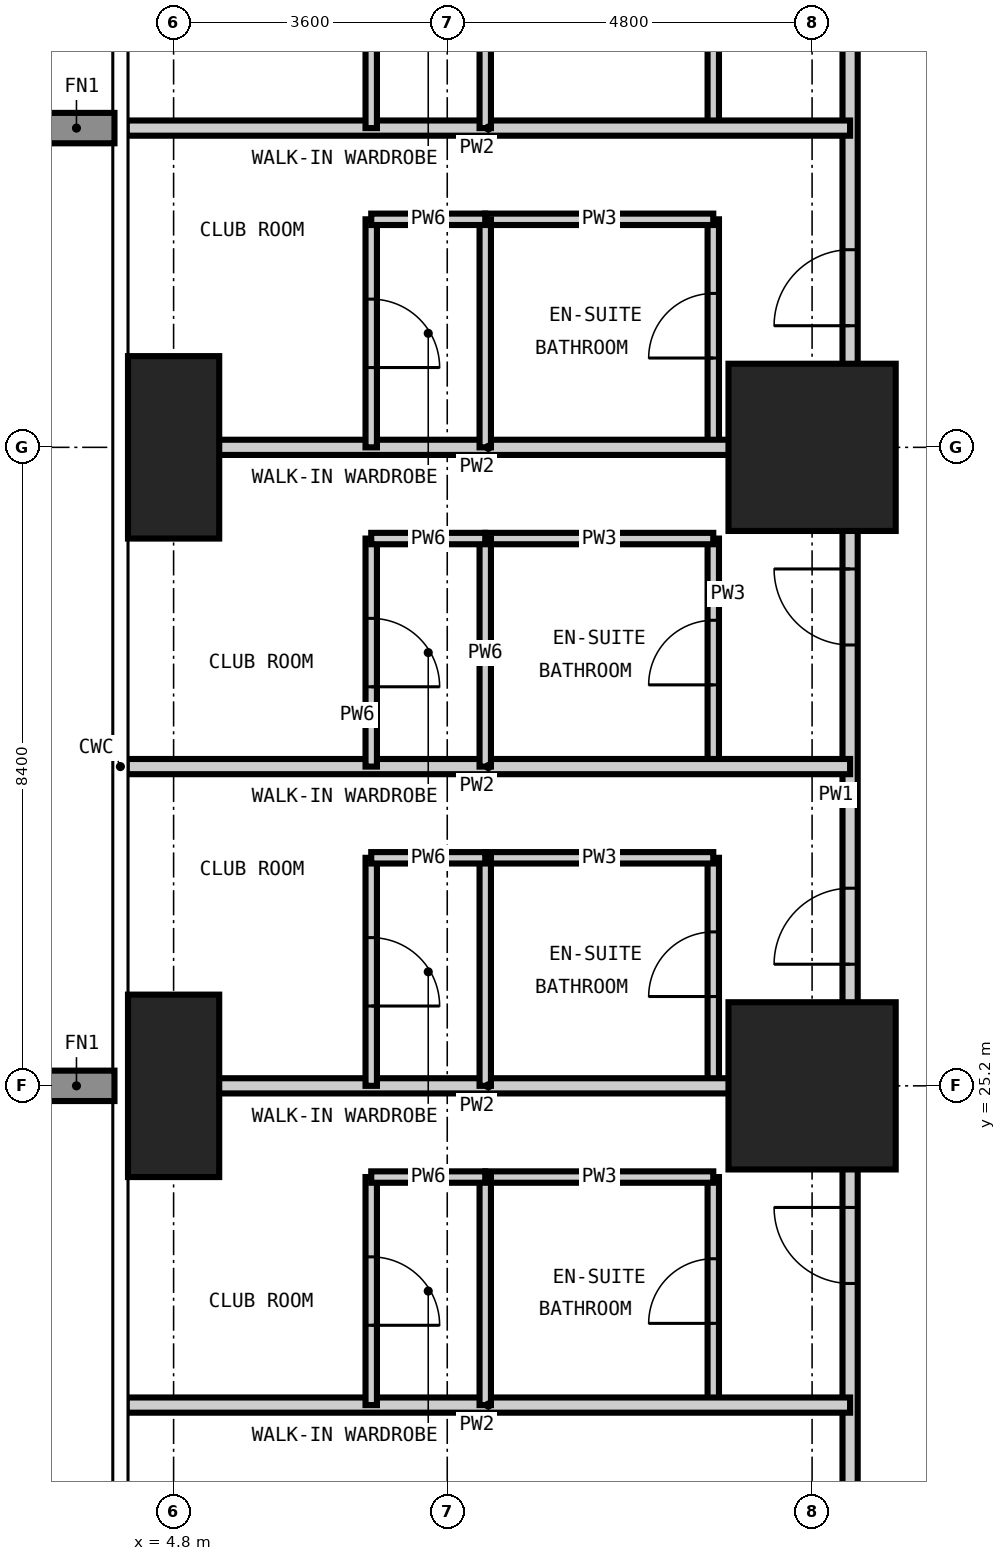
"""IFC4 building model, lengths in metres.
Left out: names, types, materials, properties, quantities, classifications, styles, units other than length and angle.
Written with IfcOpenShell. Run it as: python <this file> out.ifc"""

import sys

from ifc_helpers import new_model, si_unit, direction, frame, frame_2d, origin, origin_2d, place, context, subcontext, project, spatial, rectangle, extrude, element, fill, save


model = new_model("IFC4")
c1 = context("Model", 3, precision=1e-05, world=origin(), true_north=direction((0.0, 1.0)))
c2 = subcontext(c1, "Body", "Model", "MODEL_VIEW")
j1 = project(units=[si_unit("LENGTHUNIT", "METRE"), si_unit("PLANEANGLEUNIT", "RADIAN")], contexts=[c1])
p1 = place(None, origin())
s1 = spatial("IfcSite", under=j1, at=p1, CompositionType="ELEMENT")
p2 = place(p1, origin())
s2 = spatial("IfcBuilding", under=s1, at=p2, CompositionType="ELEMENT")
p3 = place(p2, frame((0.0, 0.0, 162.6)))
s3 = spatial("IfcBuildingStorey", under=s2, at=p3, CompositionType="ELEMENT", Elevation=162.6)
for number, where, z_axis, x_axis in (
    (1, (4.8, 25.2, -0.35), (0.0, 0.0, 1.0), (1.0, 0.0, 0.0)),
    (2, (4.8, 33.6, -0.35), (0.0, 0.0, 1.0), (1.0, 0.0, 0.0)),
):
    element("IfcColumn", number, at=place(p3, frame(where, z_axis=z_axis, x_axis=x_axis)), inside=s3, PredefinedType="COLUMN", context=c2, shape_type="SweptSolid", body=[
        extrude(rectangle(XDim=1.2, YDim=2.4, at=origin_2d()), origin(), (0.0, 0.0, 1.0), 3.6),
    ])
for number, where, z_axis, x_axis in (
    (3, (13.2, 25.2, -0.35), (0.0, 0.0, 1.0), (1.0, 0.0, 0.0)),
    (4, (13.2, 33.6, -0.35), (0.0, 0.0, 1.0), (1.0, 0.0, 0.0)),
):
    element("IfcColumn", number, at=place(p3, frame(where, z_axis=z_axis, x_axis=x_axis)), inside=s3, PredefinedType="COLUMN", context=c2, shape_type="SweptSolid", body=[
        extrude(rectangle(XDim=2.2, YDim=2.2, at=origin_2d()), origin(), (0.0, 0.0, 1.0), 3.6),
    ])
p4 = place(p3, frame((11.9, 21.0, 0.0), z_axis=(0.0, 0.0, 1.0), x_axis=(0.0, 1.0, 0.0)))
e5 = element("IfcWall", 5, at=p4, inside=s3, PredefinedType="PARTITIONING", context=c2, shape_type="SweptSolid", body=[
    extrude(rectangle(XDim=3.0, YDim=0.15, at=frame_2d((1.5, 0.0))), origin(), (0.0, 0.0, 1.0), 3.25),
])
p5 = place(p4, frame((1.075, 0.0, 0.0)))
e6 = element("IfcOpeningElement", 6, at=p5, cuts=e5, PredefinedType="OPENING", context=c2, shape_type="SweptSolid", body=[
    extrude(rectangle(XDim=0.85, YDim=2.1, at=frame_2d((0.425, 1.05))), frame((0.0, 0.085, 0.0), z_axis=(0.0, -1.0, 0.0), x_axis=(1.0, 0.0, 0.0)), (0.0, 0.0, 1.0), 0.17),
])
p6 = place(p3, frame((11.9, 25.2, 0.0), z_axis=(0.0, 0.0, 1.0), x_axis=(0.0, 1.0, 0.0)))
e7 = element("IfcWall", 7, at=p6, inside=s3, PredefinedType="PARTITIONING", context=c2, shape_type="SweptSolid", body=[
    extrude(rectangle(XDim=3.0, YDim=0.15, at=frame_2d((1.5, 0.0))), origin(), (0.0, 0.0, 1.0), 3.25),
])
p7 = place(p6, frame((1.175, 0.0, 0.0)))
e8 = element("IfcOpeningElement", 8, at=p7, cuts=e7, PredefinedType="OPENING", context=c2, shape_type="SweptSolid", body=[
    extrude(rectangle(XDim=0.85, YDim=2.1, at=frame_2d((0.425, 1.05))), frame((0.0, 0.085, 0.0), z_axis=(0.0, -1.0, 0.0), x_axis=(1.0, 0.0, 0.0)), (0.0, 0.0, 1.0), 0.17),
])
p8 = place(p3, frame((11.9, 29.4, 0.0), z_axis=(0.0, 0.0, 1.0), x_axis=(0.0, 1.0, 0.0)))
e9 = element("IfcWall", 9, at=p8, inside=s3, PredefinedType="PARTITIONING", context=c2, shape_type="SweptSolid", body=[
    extrude(rectangle(XDim=3.0, YDim=0.15, at=frame_2d((1.5, 0.0))), origin(), (0.0, 0.0, 1.0), 3.25),
])
p9 = place(p8, frame((1.075, 0.0, 0.0)))
e10 = element("IfcOpeningElement", 10, at=p9, cuts=e9, PredefinedType="OPENING", context=c2, shape_type="SweptSolid", body=[
    extrude(rectangle(XDim=0.85, YDim=2.1, at=frame_2d((0.425, 1.05))), frame((0.0, 0.085, 0.0), z_axis=(0.0, -1.0, 0.0), x_axis=(1.0, 0.0, 0.0)), (0.0, 0.0, 1.0), 0.17),
])
p10 = place(p3, frame((11.9, 33.6, 0.0), z_axis=(0.0, 0.0, 1.0), x_axis=(0.0, 1.0, 0.0)))
e11 = element("IfcWall", 11, at=p10, inside=s3, PredefinedType="PARTITIONING", context=c2, shape_type="SweptSolid", body=[
    extrude(rectangle(XDim=3.0, YDim=0.15, at=frame_2d((1.5, 0.0))), origin(), (0.0, 0.0, 1.0), 3.25),
])
p11 = place(p10, frame((1.175, 0.0, 0.0)))
e12 = element("IfcOpeningElement", 12, at=p11, cuts=e11, PredefinedType="OPENING", context=c2, shape_type="SweptSolid", body=[
    extrude(rectangle(XDim=0.85, YDim=2.1, at=frame_2d((0.425, 1.05))), frame((0.0, 0.085, 0.0), z_axis=(0.0, -1.0, 0.0), x_axis=(1.0, 0.0, 0.0)), (0.0, 0.0, 1.0), 0.17),
])
p12 = place(p3, frame((11.9, 37.8, 0.0), z_axis=(0.0, 0.0, 1.0), x_axis=(0.0, 1.0, 0.0)))
e13 = element("IfcWall", 13, at=p12, inside=s3, PredefinedType="PARTITIONING", context=c2, shape_type="SweptSolid", body=[
    extrude(rectangle(XDim=3.0, YDim=0.15, at=frame_2d((1.5, 0.0))), origin(), (0.0, 0.0, 1.0), 3.25),
])
p13 = place(p12, frame((1.075, 0.0, 0.0)))
e14 = element("IfcOpeningElement", 14, at=p13, cuts=e13, PredefinedType="OPENING", context=c2, shape_type="SweptSolid", body=[
    extrude(rectangle(XDim=0.85, YDim=2.1, at=frame_2d((0.425, 1.05))), frame((0.0, 0.085, 0.0), z_axis=(0.0, -1.0, 0.0), x_axis=(1.0, 0.0, 0.0)), (0.0, 0.0, 1.0), 0.17),
])
for number, where, z_axis, x_axis in (
    (15, (8.9, 24.0, 0.0), (0.0, 0.0, 1.0), (1.0, 0.0, 0.0)),
    (16, (8.9, 28.2, 0.0), (0.0, 0.0, 1.0), (1.0, 0.0, 0.0)),
    (17, (8.9, 32.4, 0.0), (0.0, 0.0, 1.0), (1.0, 0.0, 0.0)),
    (18, (8.9, 36.6, 0.0), (0.0, 0.0, 1.0), (1.0, 0.0, 0.0)),
):
    element("IfcWall", number, at=place(p3, frame(where, z_axis=z_axis, x_axis=x_axis)), inside=s3, PredefinedType="PARTITIONING", context=c2, shape_type="SweptSolid", body=[
        extrude(rectangle(XDim=3.0, YDim=0.15, at=frame_2d((1.5, 0.0))), origin(), (0.0, 0.0, 1.0), 3.25),
    ])
p14 = place(p3, frame((13.7, 13.7, 0.0), z_axis=(0.0, 0.0, 1.0), x_axis=(0.0, 1.0, 0.0)))
e19 = element("IfcWall", 19, at=p14, inside=s3, PredefinedType="PARTITIONING", context=c2, shape_type="SweptSolid", body=[
    extrude(rectangle(XDim=30.8, YDim=0.2, at=frame_2d((15.4, 0.0))), origin(), (0.0, 0.0, 1.0), 3.25),
])
p15 = place(p14, frame((4.7, 0.0, 0.0)))
e20 = element("IfcOpeningElement", 20, at=p15, cuts=e19, PredefinedType="OPENING", context=c2, shape_type="SweptSolid", body=[
    extrude(rectangle(XDim=1.0, YDim=2.2, at=frame_2d((0.5, 1.1))), frame((0.0, 0.11, 0.0), z_axis=(0.0, -1.0, 0.0), x_axis=(1.0, 0.0, 0.0)), (0.0, 0.0, 1.0), 0.22),
])
p16 = place(p14, frame((8.9, 0.0, 0.0)))
e21 = element("IfcOpeningElement", 21, at=p16, cuts=e19, PredefinedType="OPENING", context=c2, shape_type="SweptSolid", body=[
    extrude(rectangle(XDim=1.0, YDim=2.2, at=frame_2d((0.5, 1.1))), frame((0.0, 0.11, 0.0), z_axis=(0.0, -1.0, 0.0), x_axis=(1.0, 0.0, 0.0)), (0.0, 0.0, 1.0), 0.22),
])
p17 = place(p14, frame((13.1, 0.0, 0.0)))
e22 = element("IfcOpeningElement", 22, at=p17, cuts=e19, PredefinedType="OPENING", context=c2, shape_type="SweptSolid", body=[
    extrude(rectangle(XDim=1.0, YDim=2.2, at=frame_2d((0.5, 1.1))), frame((0.0, 0.11, 0.0), z_axis=(0.0, -1.0, 0.0), x_axis=(1.0, 0.0, 0.0)), (0.0, 0.0, 1.0), 0.22),
])
p18 = place(p14, frame((17.3, 0.0, 0.0)))
e23 = element("IfcOpeningElement", 23, at=p18, cuts=e19, PredefinedType="OPENING", context=c2, shape_type="SweptSolid", body=[
    extrude(rectangle(XDim=1.0, YDim=2.2, at=frame_2d((0.5, 1.1))), frame((0.0, 0.11, 0.0), z_axis=(0.0, -1.0, 0.0), x_axis=(1.0, 0.0, 0.0)), (0.0, 0.0, 1.0), 0.22),
])
p19 = place(p14, frame((21.5, 0.0, 0.0)))
e24 = element("IfcOpeningElement", 24, at=p19, cuts=e19, PredefinedType="OPENING", context=c2, shape_type="SweptSolid", body=[
    extrude(rectangle(XDim=1.0, YDim=2.2, at=frame_2d((0.5, 1.1))), frame((0.0, 0.11, 0.0), z_axis=(0.0, -1.0, 0.0), x_axis=(1.0, 0.0, 0.0)), (0.0, 0.0, 1.0), 0.22),
])
p20 = place(p14, frame((25.7, 0.0, 0.0)))
e25 = element("IfcOpeningElement", 25, at=p20, cuts=e19, PredefinedType="OPENING", context=c2, shape_type="SweptSolid", body=[
    extrude(rectangle(XDim=1.0, YDim=2.2, at=frame_2d((0.5, 1.1))), frame((0.0, 0.11, 0.0), z_axis=(0.0, -1.0, 0.0), x_axis=(1.0, 0.0, 0.0)), (0.0, 0.0, 1.0), 0.22),
])
p21 = place(p14, frame((0.95, 0.0, 0.0)))
e26 = element("IfcOpeningElement", 26, at=p21, cuts=e19, PredefinedType="OPENING", context=c2, shape_type="SweptSolid", body=[
    extrude(rectangle(XDim=1.0, YDim=2.2, at=frame_2d((0.5, 1.1))), frame((0.0, 0.11, 0.0), z_axis=(0.0, -1.0, 0.0), x_axis=(1.0, 0.0, 0.0)), (0.0, 0.0, 1.0), 0.22),
])
p22 = place(p14, frame((29.45, 0.0, 0.0)))
e27 = element("IfcOpeningElement", 27, at=p22, cuts=e19, PredefinedType="OPENING", context=c2, shape_type="SweptSolid", body=[
    extrude(rectangle(XDim=1.0, YDim=2.2, at=frame_2d((0.5, 1.1))), frame((0.0, 0.11, 0.0), z_axis=(0.0, -1.0, 0.0), x_axis=(1.0, 0.0, 0.0)), (0.0, 0.0, 1.0), 0.22),
])
for number, where, z_axis, x_axis in (
    (28, (4.182, 21.0, 0.0), (0.0, 0.0, 1.0), (1.0, 0.0, 0.0)),
    (29, (4.182, 25.2, 0.0), (0.0, 0.0, 1.0), (1.0, 0.0, 0.0)),
    (30, (4.182, 29.4, 0.0), (0.0, 0.0, 1.0), (1.0, 0.0, 0.0)),
    (31, (4.182, 33.6, 0.0), (0.0, 0.0, 1.0), (1.0, 0.0, 0.0)),
    (32, (4.182, 37.8, 0.0), (0.0, 0.0, 1.0), (1.0, 0.0, 0.0)),
):
    element("IfcWall", number, at=place(p3, frame(where, z_axis=z_axis, x_axis=x_axis)), inside=s3, PredefinedType="PARTITIONING", context=c2, shape_type="SweptSolid", body=[
        extrude(rectangle(XDim=9.518, YDim=0.2, at=frame_2d((4.759, 0.0))), origin(), (0.0, 0.0, 1.0), 3.25),
    ])
p23 = place(p3, frame((7.4, 21.0, 0.0), z_axis=(0.0, 0.0, 1.0), x_axis=(0.0, 1.0, 0.0)))
e33 = element("IfcWall", 33, at=p23, inside=s3, PredefinedType="PARTITIONING", context=c2, shape_type="SweptSolid", body=[
    extrude(rectangle(XDim=3.0, YDim=0.15, at=frame_2d((1.5, 0.0))), origin(), (0.0, 0.0, 1.0), 3.25),
])
p24 = place(p23, frame((1.05, 0.0, 0.0)))
e34 = element("IfcOpeningElement", 34, at=p24, cuts=e33, PredefinedType="OPENING", context=c2, shape_type="SweptSolid", body=[
    extrude(rectangle(XDim=0.9, YDim=2.1, at=frame_2d((0.45, 1.05))), frame((0.0, 0.085, 0.0), z_axis=(0.0, -1.0, 0.0), x_axis=(1.0, 0.0, 0.0)), (0.0, 0.0, 1.0), 0.17),
])
p25 = place(p3, frame((7.4, 25.2, 0.0), z_axis=(0.0, 0.0, 1.0), x_axis=(0.0, 1.0, 0.0)))
e35 = element("IfcWall", 35, at=p25, inside=s3, PredefinedType="PARTITIONING", context=c2, shape_type="SweptSolid", body=[
    extrude(rectangle(XDim=3.0, YDim=0.15, at=frame_2d((1.5, 0.0))), origin(), (0.0, 0.0, 1.0), 3.25),
])
p26 = place(p25, frame((1.05, 0.0, 0.0)))
e36 = element("IfcOpeningElement", 36, at=p26, cuts=e35, PredefinedType="OPENING", context=c2, shape_type="SweptSolid", body=[
    extrude(rectangle(XDim=0.9, YDim=2.1, at=frame_2d((0.45, 1.05))), frame((0.0, 0.085, 0.0), z_axis=(0.0, -1.0, 0.0), x_axis=(1.0, 0.0, 0.0)), (0.0, 0.0, 1.0), 0.17),
])
p27 = place(p3, frame((7.4, 29.4, 0.0), z_axis=(0.0, 0.0, 1.0), x_axis=(0.0, 1.0, 0.0)))
e37 = element("IfcWall", 37, at=p27, inside=s3, PredefinedType="PARTITIONING", context=c2, shape_type="SweptSolid", body=[
    extrude(rectangle(XDim=3.0, YDim=0.15, at=frame_2d((1.5, 0.0))), origin(), (0.0, 0.0, 1.0), 3.25),
])
p28 = place(p27, frame((1.05, 0.0, 0.0)))
e38 = element("IfcOpeningElement", 38, at=p28, cuts=e37, PredefinedType="OPENING", context=c2, shape_type="SweptSolid", body=[
    extrude(rectangle(XDim=0.9, YDim=2.1, at=frame_2d((0.45, 1.05))), frame((0.0, 0.085, 0.0), z_axis=(0.0, -1.0, 0.0), x_axis=(1.0, 0.0, 0.0)), (0.0, 0.0, 1.0), 0.17),
])
p29 = place(p3, frame((7.4, 33.6, 0.0), z_axis=(0.0, 0.0, 1.0), x_axis=(0.0, 1.0, 0.0)))
e39 = element("IfcWall", 39, at=p29, inside=s3, PredefinedType="PARTITIONING", context=c2, shape_type="SweptSolid", body=[
    extrude(rectangle(XDim=3.0, YDim=0.15, at=frame_2d((1.5, 0.0))), origin(), (0.0, 0.0, 1.0), 3.25),
])
p30 = place(p29, frame((1.05, 0.0, 0.0)))
e40 = element("IfcOpeningElement", 40, at=p30, cuts=e39, PredefinedType="OPENING", context=c2, shape_type="SweptSolid", body=[
    extrude(rectangle(XDim=0.9, YDim=2.1, at=frame_2d((0.45, 1.05))), frame((0.0, 0.085, 0.0), z_axis=(0.0, -1.0, 0.0), x_axis=(1.0, 0.0, 0.0)), (0.0, 0.0, 1.0), 0.17),
])
p31 = place(p3, frame((7.4, 37.8, 0.0), z_axis=(0.0, 0.0, 1.0), x_axis=(0.0, 1.0, 0.0)))
e41 = element("IfcWall", 41, at=p31, inside=s3, PredefinedType="PARTITIONING", context=c2, shape_type="SweptSolid", body=[
    extrude(rectangle(XDim=3.0, YDim=0.15, at=frame_2d((1.5, 0.0))), origin(), (0.0, 0.0, 1.0), 3.25),
])
p32 = place(p31, frame((1.05, 0.0, 0.0)))
e42 = element("IfcOpeningElement", 42, at=p32, cuts=e41, PredefinedType="OPENING", context=c2, shape_type="SweptSolid", body=[
    extrude(rectangle(XDim=0.9, YDim=2.1, at=frame_2d((0.45, 1.05))), frame((0.0, 0.085, 0.0), z_axis=(0.0, -1.0, 0.0), x_axis=(1.0, 0.0, 0.0)), (0.0, 0.0, 1.0), 0.17),
])
for number, where, z_axis, x_axis in (
    (43, (8.9, 21.0, 0.0), (0.0, 0.0, 1.0), (0.0, 1.0, 0.0)),
    (44, (8.9, 25.2, 0.0), (0.0, 0.0, 1.0), (0.0, 1.0, 0.0)),
    (45, (8.9, 29.4, 0.0), (0.0, 0.0, 1.0), (0.0, 1.0, 0.0)),
    (46, (8.9, 33.6, 0.0), (0.0, 0.0, 1.0), (0.0, 1.0, 0.0)),
    (47, (8.9, 37.8, 0.0), (0.0, 0.0, 1.0), (0.0, 1.0, 0.0)),
):
    element("IfcWall", number, at=place(p3, frame(where, z_axis=z_axis, x_axis=x_axis)), inside=s3, PredefinedType="PARTITIONING", context=c2, shape_type="SweptSolid", body=[
        extrude(rectangle(XDim=3.0, YDim=0.15, at=frame_2d((1.5, 0.0))), origin(), (0.0, 0.0, 1.0), 3.25),
    ])
for number, where, z_axis, x_axis in (
    (48, (7.4, 24.0, 0.0), (0.0, 0.0, 1.0), (1.0, 0.0, 0.0)),
    (49, (7.4, 28.2, 0.0), (0.0, 0.0, 1.0), (1.0, 0.0, 0.0)),
    (50, (7.4, 32.4, 0.0), (0.0, 0.0, 1.0), (1.0, 0.0, 0.0)),
    (51, (7.4, 36.6, 0.0), (0.0, 0.0, 1.0), (1.0, 0.0, 0.0)),
):
    element("IfcWall", number, at=place(p3, frame(where, z_axis=z_axis, x_axis=x_axis)), inside=s3, PredefinedType="PARTITIONING", context=c2, shape_type="SweptSolid", body=[
        extrude(rectangle(XDim=1.5, YDim=0.15, at=frame_2d((0.75, 0.0))), origin(), (0.0, 0.0, 1.0), 3.25),
    ])
p33 = place(p16, origin())
e52 = element("IfcDoor", 52, at=p33, inside=s3, OperationType="SINGLE_SWING_RIGHT", PredefinedType="DOOR", context=c2, shape_type="SweptSolid", body=[
    extrude(rectangle(XDim=1.0, YDim=2.2, at=frame_2d((0.5, 1.1))), frame((0.0, 0.025, 0.0), z_axis=(0.0, -1.0, 0.0), x_axis=(1.0, 0.0, 0.0)), (0.0, 0.0, 1.0), 0.05),
])
fill(e21, e52)
p34 = place(p5, origin())
e53 = element("IfcDoor", 53, at=p34, inside=s3, OperationType="SINGLE_SWING_LEFT", PredefinedType="DOOR", context=c2, shape_type="SweptSolid", body=[
    extrude(rectangle(XDim=0.85, YDim=2.1, at=frame_2d((0.425, 1.05))), frame((0.0, 0.025, 0.0), z_axis=(0.0, -1.0, 0.0), x_axis=(1.0, 0.0, 0.0)), (0.0, 0.0, 1.0), 0.05),
])
fill(e6, e53)
p35 = place(p24, frame((0.9, 0.0, 0.0), z_axis=(0.0, 0.0, 1.0), x_axis=(-1.0, 0.0, 0.0)))
e54 = element("IfcDoor", 54, at=p35, inside=s3, OperationType="SINGLE_SWING_RIGHT", PredefinedType="DOOR", context=c2, shape_type="SweptSolid", body=[
    extrude(rectangle(XDim=0.9, YDim=2.1, at=frame_2d((0.45, 1.05))), frame((0.0, 0.025, 0.0), z_axis=(0.0, -1.0, 0.0), x_axis=(1.0, 0.0, 0.0)), (0.0, 0.0, 1.0), 0.05),
])
fill(e34, e54)
p36 = place(p17, origin())
e55 = element("IfcDoor", 55, at=p36, inside=s3, OperationType="SINGLE_SWING_LEFT", PredefinedType="DOOR", context=c2, shape_type="SweptSolid", body=[
    extrude(rectangle(XDim=1.0, YDim=2.2, at=frame_2d((0.5, 1.1))), frame((0.0, 0.025, 0.0), z_axis=(0.0, -1.0, 0.0), x_axis=(1.0, 0.0, 0.0)), (0.0, 0.0, 1.0), 0.05),
])
fill(e22, e55)
p37 = place(p7, origin())
e56 = element("IfcDoor", 56, at=p37, inside=s3, OperationType="SINGLE_SWING_LEFT", PredefinedType="DOOR", context=c2, shape_type="SweptSolid", body=[
    extrude(rectangle(XDim=0.85, YDim=2.1, at=frame_2d((0.425, 1.05))), frame((0.0, 0.025, 0.0), z_axis=(0.0, -1.0, 0.0), x_axis=(1.0, 0.0, 0.0)), (0.0, 0.0, 1.0), 0.05),
])
fill(e8, e56)
p38 = place(p26, frame((0.9, 0.0, 0.0), z_axis=(0.0, 0.0, 1.0), x_axis=(-1.0, 0.0, 0.0)))
e57 = element("IfcDoor", 57, at=p38, inside=s3, OperationType="SINGLE_SWING_RIGHT", PredefinedType="DOOR", context=c2, shape_type="SweptSolid", body=[
    extrude(rectangle(XDim=0.9, YDim=2.1, at=frame_2d((0.45, 1.05))), frame((0.0, 0.025, 0.0), z_axis=(0.0, -1.0, 0.0), x_axis=(1.0, 0.0, 0.0)), (0.0, 0.0, 1.0), 0.05),
])
fill(e36, e57)
p39 = place(p18, origin())
e58 = element("IfcDoor", 58, at=p39, inside=s3, OperationType="SINGLE_SWING_RIGHT", PredefinedType="DOOR", context=c2, shape_type="SweptSolid", body=[
    extrude(rectangle(XDim=1.0, YDim=2.2, at=frame_2d((0.5, 1.1))), frame((0.0, 0.025, 0.0), z_axis=(0.0, -1.0, 0.0), x_axis=(1.0, 0.0, 0.0)), (0.0, 0.0, 1.0), 0.05),
])
fill(e23, e58)
p40 = place(p9, origin())
e59 = element("IfcDoor", 59, at=p40, inside=s3, OperationType="SINGLE_SWING_LEFT", PredefinedType="DOOR", context=c2, shape_type="SweptSolid", body=[
    extrude(rectangle(XDim=0.85, YDim=2.1, at=frame_2d((0.425, 1.05))), frame((0.0, 0.025, 0.0), z_axis=(0.0, -1.0, 0.0), x_axis=(1.0, 0.0, 0.0)), (0.0, 0.0, 1.0), 0.05),
])
fill(e10, e59)
p41 = place(p28, frame((0.9, 0.0, 0.0), z_axis=(0.0, 0.0, 1.0), x_axis=(-1.0, 0.0, 0.0)))
e60 = element("IfcDoor", 60, at=p41, inside=s3, OperationType="SINGLE_SWING_RIGHT", PredefinedType="DOOR", context=c2, shape_type="SweptSolid", body=[
    extrude(rectangle(XDim=0.9, YDim=2.1, at=frame_2d((0.45, 1.05))), frame((0.0, 0.025, 0.0), z_axis=(0.0, -1.0, 0.0), x_axis=(1.0, 0.0, 0.0)), (0.0, 0.0, 1.0), 0.05),
])
fill(e38, e60)
p42 = place(p19, origin())
e61 = element("IfcDoor", 61, at=p42, inside=s3, OperationType="SINGLE_SWING_LEFT", PredefinedType="DOOR", context=c2, shape_type="SweptSolid", body=[
    extrude(rectangle(XDim=1.0, YDim=2.2, at=frame_2d((0.5, 1.1))), frame((0.0, 0.025, 0.0), z_axis=(0.0, -1.0, 0.0), x_axis=(1.0, 0.0, 0.0)), (0.0, 0.0, 1.0), 0.05),
])
fill(e24, e61)
p43 = place(p11, origin())
e62 = element("IfcDoor", 62, at=p43, inside=s3, OperationType="SINGLE_SWING_LEFT", PredefinedType="DOOR", context=c2, shape_type="SweptSolid", body=[
    extrude(rectangle(XDim=0.85, YDim=2.1, at=frame_2d((0.425, 1.05))), frame((0.0, 0.025, 0.0), z_axis=(0.0, -1.0, 0.0), x_axis=(1.0, 0.0, 0.0)), (0.0, 0.0, 1.0), 0.05),
])
fill(e12, e62)
p44 = place(p30, frame((0.9, 0.0, 0.0), z_axis=(0.0, 0.0, 1.0), x_axis=(-1.0, 0.0, 0.0)))
e63 = element("IfcDoor", 63, at=p44, inside=s3, OperationType="SINGLE_SWING_RIGHT", PredefinedType="DOOR", context=c2, shape_type="SweptSolid", body=[
    extrude(rectangle(XDim=0.9, YDim=2.1, at=frame_2d((0.45, 1.05))), frame((0.0, 0.025, 0.0), z_axis=(0.0, -1.0, 0.0), x_axis=(1.0, 0.0, 0.0)), (0.0, 0.0, 1.0), 0.05),
])
fill(e40, e63)
save(model, sys.argv[1])
